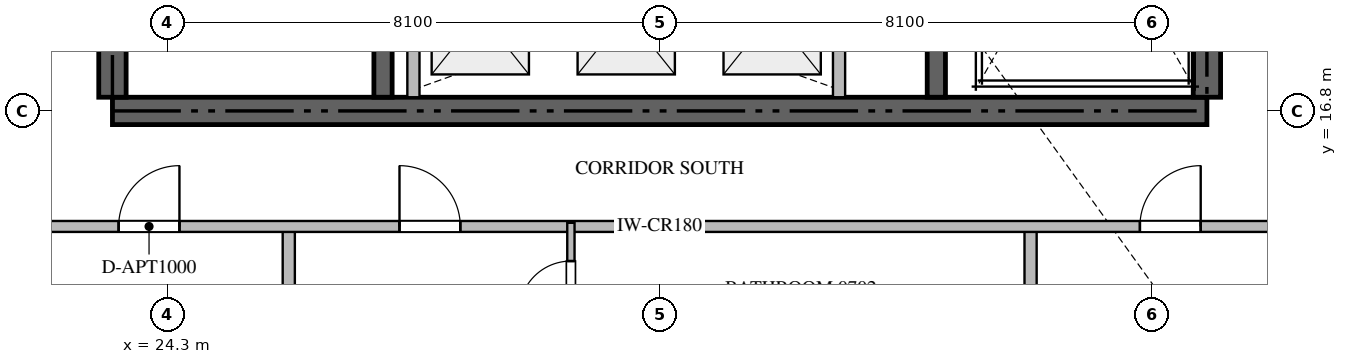
"""IFC4 building model, lengths in metres.
Left out: names, types, materials, properties, quantities, classifications, styles, units other than length and angle.
Written with IfcOpenShell. Run it as: python <this file> out.ifc"""

import sys

from ifc_helpers import new_model, si_unit, direction, frame, frame_2d, origin, place, context, subcontext, project, spatial, rectangle, extrude, source, transform, mapped, element, fill, save


model = new_model("IFC4")
c1 = context("Model", 3, precision=1e-05, world=origin(), true_north=direction((0.0, 1.0)))
c2 = subcontext(c1, "Body", "Model", "MODEL_VIEW")
j1 = project(units=[si_unit("LENGTHUNIT", "METRE"), si_unit("PLANEANGLEUNIT", "RADIAN")], contexts=[c1])
p1 = place(None, origin())
s1 = spatial("IfcSite", under=j1, at=p1, CompositionType="ELEMENT")
p2 = place(p1, origin())
s2 = spatial("IfcBuilding", under=s1, at=p2, CompositionType="ELEMENT")
p3 = place(p2, frame((0.0, 0.0, 34.2)))
s3 = spatial("IfcBuildingStorey", under=s2, at=p3, CompositionType="ELEMENT", Elevation=34.2)
p4 = place(p3, frame((23.4, 16.8, -0.26), z_axis=(0.0, 0.0, 1.0), x_axis=(1.0, 0.0, 0.0)))
e1 = element("IfcWall", 1, at=p4, inside=s3, PredefinedType="SHEAR", context=c2, shape_type="SweptSolid", body=[
    extrude(rectangle(XDim=18.0, YDim=0.45, at=frame_2d((9.0, 0.0))), origin(), (0.0, 0.0, 1.0), 3.748),
])
p5 = place(p3, frame((23.4, 17.025, -0.26), z_axis=(0.0, 0.0, 1.0), x_axis=(0.0, 1.0, 0.0)))
e2 = element("IfcWall", 2, at=p5, inside=s3, PredefinedType="SHEAR", context=c2, shape_type="SweptSolid", body=[
    extrude(rectangle(XDim=4.825, YDim=0.45, at=frame_2d((2.413, 0.0))), origin(), (0.0, 0.0, 1.0), 3.748),
])
p6 = place(p3, frame((41.4, 17.025, -0.26), z_axis=(0.0, 0.0, 1.0), x_axis=(0.0, 1.0, 0.0)))
e3 = element("IfcWall", 3, at=p6, inside=s3, PredefinedType="SHEAR", context=c2, shape_type="SweptSolid", body=[
    extrude(rectangle(XDim=8.325, YDim=0.45, at=frame_2d((4.163, 0.0))), origin(), (0.0, 0.0, 1.0), 3.748),
])
p7 = place(p3, frame((27.85, 17.025, -0.26), z_axis=(0.0, 0.0, 1.0), x_axis=(0.0, 1.0, 0.0)))
e4 = element("IfcWall", 4, at=p7, inside=s3, PredefinedType="SHEAR", context=c2, shape_type="SweptSolid", body=[
    extrude(rectangle(XDim=4.825, YDim=0.3, at=frame_2d((2.413, 0.0))), origin(), (0.0, 0.0, 1.0), 3.748),
])
p8 = place(p3, frame((36.95, 17.025, -0.26), z_axis=(0.0, 0.0, 1.0), x_axis=(0.0, 1.0, 0.0)))
e5 = element("IfcWall", 5, at=p8, inside=s3, PredefinedType="SHEAR", context=c2, shape_type="SweptSolid", body=[
    extrude(rectangle(XDim=8.325, YDim=0.3, at=frame_2d((4.163, 0.0))), origin(), (0.0, 0.0, 1.0), 3.748),
])
for number, where, z_axis, x_axis in (
    (6, (28.35, 17.025, 0.0), (0.0, 0.0, 1.0), (0.0, 1.0, 0.0)),
    (7, (35.35, 17.025, 0.0), (0.0, 0.0, 1.0), (0.0, 1.0, 0.0)),
):
    element("IfcWall", number, at=place(p3, frame(where, z_axis=z_axis, x_axis=x_axis)), inside=s3, PredefinedType="STANDARD", context=c2, shape_type="SweptSolid", body=[
        extrude(rectangle(XDim=2.525, YDim=0.2, at=frame_2d((1.263, 0.0))), origin(), (0.0, 0.0, 1.0), 3.49),
    ])
for number, where, z_axis, x_axis in (
    (8, (26.3, 0.282, 0.0), (0.0, 0.0, 1.0), (0.0, 1.0, 0.0)),
    (9, (38.5, 0.282, 0.0), (0.0, 0.0, 1.0), (0.0, 1.0, 0.0)),
):
    element("IfcWall", number, at=place(p3, frame(where, z_axis=z_axis, x_axis=x_axis)), inside=s3, PredefinedType="PARTITIONING", context=c2, shape_type="SweptSolid", body=[
        extrude(rectangle(XDim=14.618, YDim=0.2, at=frame_2d((7.309, 0.0))), origin(), (0.0, 0.0, 1.0), 3.49),
    ])
p9 = place(p3, frame((21.402, 14.9, 0.0), z_axis=(0.0, 0.0, 1.0), x_axis=(1.0, 0.0, 0.0)))
e10 = element("IfcWall", 10, at=p9, inside=s3, PredefinedType="PARTITIONING", context=c2, shape_type="SweptSolid", body=[
    extrude(rectangle(XDim=21.996, YDim=0.18, at=frame_2d((10.998, 0.0))), origin(), (0.0, 0.0, 1.0), 3.49),
])
p10 = place(p9, frame((2.1, 0.0, 0.0)))
e11 = element("IfcOpeningElement", 11, at=p10, cuts=e10, PredefinedType="OPENING", context=c2, shape_type="SweptSolid", body=[
    extrude(rectangle(XDim=1.0, YDim=2.15, at=frame_2d((0.5, 1.075))), frame((0.0, 0.1, 0.0), z_axis=(0.0, -1.0, 0.0), x_axis=(1.0, 0.0, 0.0)), (0.0, 0.0, 1.0), 0.2),
])
p11 = place(p9, frame((6.719, 0.0, 0.0)))
e12 = element("IfcOpeningElement", 12, at=p11, cuts=e10, PredefinedType="OPENING", context=c2, shape_type="SweptSolid", body=[
    extrude(rectangle(XDim=1.0, YDim=2.15, at=frame_2d((0.5, 1.075))), frame((0.0, 0.1, 0.0), z_axis=(0.0, -1.0, 0.0), x_axis=(1.0, 0.0, 0.0)), (0.0, 0.0, 1.0), 0.2),
])
p12 = place(p9, frame((18.896, 0.0, 0.0)))
e13 = element("IfcOpeningElement", 13, at=p12, cuts=e10, PredefinedType="OPENING", context=c2, shape_type="SweptSolid", body=[
    extrude(rectangle(XDim=1.0, YDim=2.15, at=frame_2d((0.5, 1.075))), frame((0.0, 0.1, 0.0), z_axis=(0.0, -1.0, 0.0), x_axis=(1.0, 0.0, 0.0)), (0.0, 0.0, 1.0), 0.2),
])
p13 = place(p3, frame((30.94, 12.852, 0.0), z_axis=(0.0, 0.0, 1.0), x_axis=(0.0, 1.0, 0.0)))
e14 = element("IfcWall", 14, at=p13, inside=s3, PredefinedType="PARTITIONING", context=c2, shape_type="SweptSolid", body=[
    extrude(rectangle(XDim=2.108, YDim=0.12, at=frame_2d((1.054, 0.0))), origin(), (0.0, 0.0, 1.0), 3.49),
])
p14 = place(p13, frame((0.629, 0.0, 0.0)))
e15 = element("IfcOpeningElement", 15, at=p14, cuts=e14, PredefinedType="OPENING", context=c2, shape_type="SweptSolid", body=[
    extrude(rectangle(XDim=0.85, YDim=2.1, at=frame_2d((0.425, 1.05))), frame((0.0, 0.07, 0.0), z_axis=(0.0, -1.0, 0.0), x_axis=(1.0, 0.0, 0.0)), (0.0, 0.0, 1.0), 0.14),
])
m1 = source(origin(), c2, "Body", "SweptSolid", [
    extrude(rectangle(XDim=1.0, YDim=2.15, at=frame_2d((0.5, 1.075))), frame((0.0, 0.025, 0.0), z_axis=(0.0, -1.0, 0.0), x_axis=(1.0, 0.0, 0.0)), (0.0, 0.0, 1.0), 0.05),
])
p15 = place(p10, origin())
e16 = element("IfcDoor", 16, at=p15, inside=s3, OperationType="SINGLE_SWING_RIGHT", PredefinedType="DOOR", context=c2, shape_type="MappedRepresentation", body=[
    mapped(m1, transform((0.0, 0.0, 0.0), scale=1.0)),
])
fill(e11, e16)
p16 = place(p11, origin())
e17 = element("IfcDoor", 17, at=p16, inside=s3, OperationType="SINGLE_SWING_LEFT", PredefinedType="DOOR", context=c2, shape_type="MappedRepresentation", body=[
    mapped(m1, transform((0.0, 0.0, 0.0), scale=1.0)),
])
fill(e12, e17)
p17 = place(p12, origin())
e18 = element("IfcDoor", 18, at=p17, inside=s3, OperationType="SINGLE_SWING_RIGHT", PredefinedType="DOOR", context=c2, shape_type="MappedRepresentation", body=[
    mapped(m1, transform((0.0, 0.0, 0.0), scale=1.0)),
])
fill(e13, e18)
m2 = source(origin(), c2, "Body", "SweptSolid", [
    extrude(rectangle(XDim=0.85, YDim=2.1, at=frame_2d((0.425, 1.05))), frame((0.0, 0.025, 0.0), z_axis=(0.0, -1.0, 0.0), x_axis=(1.0, 0.0, 0.0)), (0.0, 0.0, 1.0), 0.05),
])
p18 = place(p14, origin())
e19 = element("IfcDoor", 19, at=p18, inside=s3, OperationType="SINGLE_SWING_LEFT", PredefinedType="DOOR", context=c2, shape_type="MappedRepresentation", body=[
    mapped(m2, transform((0.0, 0.0, 0.0), scale=1.0)),
])
fill(e15, e19)
save(model, sys.argv[1])
